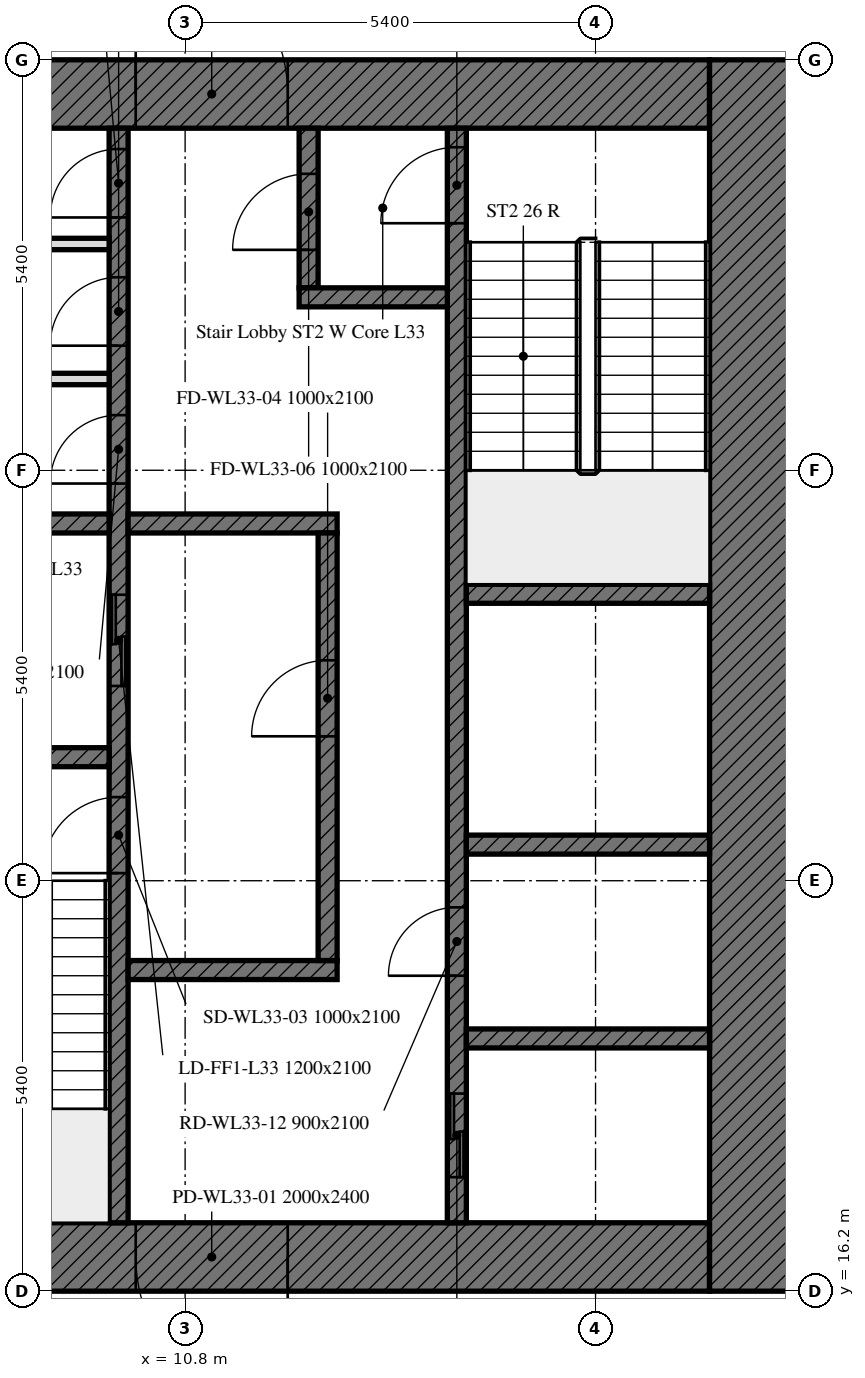
"""IFC4 building model, lengths in metres.
Left out: names, types, materials, properties, quantities, classifications, styles, units other than length and angle.
Written with IfcOpenShell. Run it as: python <this file> out.ifc"""

import sys

from ifc_helpers import new_model, si_unit, direction, frame, frame_2d, origin, place, context, subcontext, project, spatial, rectangle, extrude, element, fill, save


model = new_model("IFC4")
c1 = context("Model", 3, precision=1e-05, world=origin(), true_north=direction((0.0, 1.0)))
c2 = subcontext(c1, "Body", "Model", "MODEL_VIEW")
j1 = project(units=[si_unit("LENGTHUNIT", "METRE"), si_unit("PLANEANGLEUNIT", "RADIAN")], contexts=[c1])
p1 = place(None, origin())
s1 = spatial("IfcSite", under=j1, at=p1, CompositionType="ELEMENT")
p2 = place(p1, origin())
s2 = spatial("IfcBuilding", under=s1, at=p2, CompositionType="ELEMENT")
p3 = place(p2, frame((0.0, 0.0, 143.2)))
s3 = spatial("IfcBuildingStorey", under=s2, at=p3, CompositionType="ELEMENT", Elevation=143.2)
p4 = place(p3, frame((17.7, 16.65, 0.0), z_axis=(0.0, 0.0, 1.0), x_axis=(-1.0, 0.0, 0.0)))
e1 = element("IfcWall", 1, at=p4, inside=s3, PredefinedType="SOLIDWALL", context=c2, shape_type="SweptSolid", body=[
    extrude(rectangle(XDim=11.1, YDim=0.9, at=frame_2d((5.55, 0.0))), origin(), (0.0, 0.0, 1.0), 4.5),
])
p5 = place(p4, frame((5.55, 0.0, 0.0)))
e2 = element("IfcOpeningElement", 2, at=p5, cuts=e1, PredefinedType="OPENING", context=c2, shape_type="SweptSolid", body=[
    extrude(rectangle(XDim=2.0, YDim=2.4, at=frame_2d((1.0, 1.2))), frame((0.0, 0.45, 0.0), z_axis=(0.0, -1.0, 0.0), x_axis=(1.0, 0.0, 0.0)), (0.0, 0.0, 1.0), 0.9),
])
p6 = place(p3, frame((6.6, 31.95, 0.0), z_axis=(0.0, 0.0, 1.0), x_axis=(1.0, 0.0, 0.0)))
e3 = element("IfcWall", 3, at=p6, inside=s3, PredefinedType="SOLIDWALL", context=c2, shape_type="SweptSolid", body=[
    extrude(rectangle(XDim=11.1, YDim=0.9, at=frame_2d((5.55, 0.0))), origin(), (0.0, 0.0, 1.0), 4.5),
])
p7 = place(p6, frame((3.55, 0.0, 0.0)))
e4 = element("IfcOpeningElement", 4, at=p7, cuts=e3, PredefinedType="OPENING", context=c2, shape_type="SweptSolid", body=[
    extrude(rectangle(XDim=2.0, YDim=2.4, at=frame_2d((1.0, 1.2))), frame((0.0, 0.45, 0.0), z_axis=(0.0, -1.0, 0.0), x_axis=(1.0, 0.0, 0.0)), (0.0, 0.0, 1.0), 0.9),
])
p8 = place(p3, frame((18.3, 32.4, 0.0), z_axis=(0.0, 0.0, 1.0), x_axis=(0.0, -1.0, 0.0)))
e5 = element("IfcWall", 5, at=p8, inside=s3, PredefinedType="SOLIDWALL", context=c2, shape_type="SweptSolid", body=[
    extrude(rectangle(XDim=16.2, YDim=1.2, at=frame_2d((8.1, 0.0))), origin(), (0.0, 0.0, 1.0), 4.5),
])
p9 = place(p3, frame((9.925, 17.1, 0.0), z_axis=(0.0, 0.0, 1.0), x_axis=(0.0, 1.0, 0.0)))
e6 = element("IfcWall", 6, at=p9, inside=s3, PredefinedType="SOLIDWALL", context=c2, shape_type="SweptSolid", body=[
    extrude(rectangle(XDim=14.4, YDim=0.25, at=frame_2d((7.2, 0.0))), origin(), (0.0, 0.0, 1.0), 4.5),
])
p10 = place(p9, frame((4.6, 0.0, 0.0)))
e7 = element("IfcOpeningElement", 7, at=p10, cuts=e6, PredefinedType="OPENING", context=c2, shape_type="SweptSolid", body=[
    extrude(rectangle(XDim=1.0, YDim=2.1, at=frame_2d((0.5, 1.05))), frame((0.0, 0.125, 0.0), z_axis=(0.0, -1.0, 0.0), x_axis=(1.0, 0.0, 0.0)), (0.0, 0.0, 1.0), 0.25),
])
p11 = place(p9, frame((7.062, 0.0, 0.0)))
e8 = element("IfcOpeningElement", 8, at=p11, cuts=e6, PredefinedType="OPENING", context=c2, shape_type="SweptSolid", body=[
    extrude(rectangle(XDim=1.2, YDim=2.1, at=frame_2d((0.6, 1.05))), frame((0.0, 0.125, 0.0), z_axis=(0.0, -1.0, 0.0), x_axis=(1.0, 0.0, 0.0)), (0.0, 0.0, 1.0), 0.25),
])
p12 = place(p9, frame((9.726, 0.0, 0.0)))
e9 = element("IfcOpeningElement", 9, at=p12, cuts=e6, PredefinedType="OPENING", context=c2, shape_type="SweptSolid", body=[
    extrude(rectangle(XDim=0.9, YDim=2.1, at=frame_2d((0.45, 1.05))), frame((0.0, 0.125, 0.0), z_axis=(0.0, -1.0, 0.0), x_axis=(1.0, 0.0, 0.0)), (0.0, 0.0, 1.0), 0.25),
])
p13 = place(p9, frame((11.539, 0.0, 0.0)))
e10 = element("IfcOpeningElement", 10, at=p13, cuts=e6, PredefinedType="OPENING", context=c2, shape_type="SweptSolid", body=[
    extrude(rectangle(XDim=0.9, YDim=2.1, at=frame_2d((0.45, 1.05))), frame((0.0, 0.125, 0.0), z_axis=(0.0, -1.0, 0.0), x_axis=(1.0, 0.0, 0.0)), (0.0, 0.0, 1.0), 0.25),
])
p14 = place(p9, frame((13.226, 0.0, 0.0)))
e11 = element("IfcOpeningElement", 11, at=p14, cuts=e6, PredefinedType="OPENING", context=c2, shape_type="SweptSolid", body=[
    extrude(rectangle(XDim=0.9, YDim=2.1, at=frame_2d((0.45, 1.05))), frame((0.0, 0.125, 0.0), z_axis=(0.0, -1.0, 0.0), x_axis=(1.0, 0.0, 0.0)), (0.0, 0.0, 1.0), 0.25),
])
p15 = place(p3, frame((14.375, 17.1, 0.0), z_axis=(0.0, 0.0, 1.0), x_axis=(0.0, 1.0, 0.0)))
e12 = element("IfcWall", 12, at=p15, inside=s3, PredefinedType="SOLIDWALL", context=c2, shape_type="SweptSolid", body=[
    extrude(rectangle(XDim=14.4, YDim=0.25, at=frame_2d((7.2, 0.0))), origin(), (0.0, 0.0, 1.0), 4.5),
])
p16 = place(p15, frame((13.15, 0.0, 0.0)))
e13 = element("IfcOpeningElement", 13, at=p16, cuts=e12, PredefinedType="OPENING", context=c2, shape_type="SweptSolid", body=[
    extrude(rectangle(XDim=1.0, YDim=2.1, at=frame_2d((0.5, 1.05))), frame((0.0, 0.125, 0.0), z_axis=(0.0, -1.0, 0.0), x_axis=(1.0, 0.0, 0.0)), (0.0, 0.0, 1.0), 0.25),
])
p17 = place(p15, frame((0.6, 0.0, 0.0)))
e14 = element("IfcOpeningElement", 14, at=p17, cuts=e12, PredefinedType="OPENING", context=c2, shape_type="SweptSolid", body=[
    extrude(rectangle(XDim=1.1, YDim=2.1, at=frame_2d((0.55, 1.05))), frame((0.0, 0.125, 0.0), z_axis=(0.0, -1.0, 0.0), x_axis=(1.0, 0.0, 0.0)), (0.0, 0.0, 1.0), 0.25),
])
p18 = place(p15, frame((3.25, 0.0, 0.0)))
e15 = element("IfcOpeningElement", 15, at=p18, cuts=e12, PredefinedType="OPENING", context=c2, shape_type="SweptSolid", body=[
    extrude(rectangle(XDim=0.9, YDim=2.1, at=frame_2d((0.45, 1.05))), frame((0.0, 0.125, 0.0), z_axis=(0.0, -1.0, 0.0), x_axis=(1.0, 0.0, 0.0)), (0.0, 0.0, 1.0), 0.25),
])
for number, where, z_axis, x_axis in (
    (16, (6.6, 23.225, 0.0), (0.0, 0.0, 1.0), (1.0, 0.0, 0.0)),
    (17, (14.5, 25.375, 0.0), (0.0, 0.0, 1.0), (1.0, 0.0, 0.0)),
    (18, (14.5, 22.075, 0.0), (0.0, 0.0, 1.0), (1.0, 0.0, 0.0)),
    (19, (6.6, 26.3, 0.0), (0.0, 0.0, 1.0), (1.0, 0.0, 0.0)),
):
    element("IfcWall", number, at=place(p3, frame(where, z_axis=z_axis, x_axis=x_axis)), inside=s3, PredefinedType="SOLIDWALL", context=c2, shape_type="SweptSolid", body=[
        extrude(rectangle(XDim=3.2, YDim=0.25, at=frame_2d((1.6, 0.0))), origin(), (0.0, 0.0, 1.0), 4.5),
    ])
for number, where, z_axis, x_axis in (
    (20, (10.05, 26.3, 0.0), (0.0, 0.0, 1.0), (1.0, 0.0, 0.0)),
    (21, (10.05, 20.425, 0.0), (0.0, 0.0, 1.0), (1.0, 0.0, 0.0)),
):
    element("IfcWall", number, at=place(p3, frame(where, z_axis=z_axis, x_axis=x_axis)), inside=s3, PredefinedType="SOLIDWALL", context=c2, shape_type="SweptSolid", body=[
        extrude(rectangle(XDim=2.75, YDim=0.25, at=frame_2d((1.375, 0.0))), origin(), (0.0, 0.0, 1.0), 4.5),
    ])
p19 = place(p3, frame((12.425, 29.4, 0.0), z_axis=(0.0, 0.0, 1.0), x_axis=(0.0, 1.0, 0.0)))
e22 = element("IfcWall", 22, at=p19, inside=s3, PredefinedType="SOLIDWALL", context=c2, shape_type="SweptSolid", body=[
    extrude(rectangle(XDim=2.1, YDim=0.25, at=frame_2d((1.05, 0.0))), origin(), (0.0, 0.0, 1.0), 4.5),
])
p20 = place(p19, frame((0.5, 0.0, 0.0)))
e23 = element("IfcOpeningElement", 23, at=p20, cuts=e22, PredefinedType="OPENING", context=c2, shape_type="SweptSolid", body=[
    extrude(rectangle(XDim=1.0, YDim=2.1, at=frame_2d((0.5, 1.05))), frame((0.0, 0.125, 0.0), z_axis=(0.0, -1.0, 0.0), x_axis=(1.0, 0.0, 0.0)), (0.0, 0.0, 1.0), 0.25),
])
p21 = place(p3, frame((12.3, 29.275, 0.0), z_axis=(0.0, 0.0, 1.0), x_axis=(1.0, 0.0, 0.0)))
e24 = element("IfcWall", 24, at=p21, inside=s3, PredefinedType="SOLIDWALL", context=c2, shape_type="SweptSolid", body=[
    extrude(rectangle(XDim=1.95, YDim=0.25, at=frame_2d((0.975, 0.0))), origin(), (0.0, 0.0, 1.0), 4.5),
])
p22 = place(p3, frame((12.675, 20.55, 0.0), z_axis=(0.0, 0.0, 1.0), x_axis=(0.0, 1.0, 0.0)))
e25 = element("IfcWall", 25, at=p22, inside=s3, PredefinedType="SOLIDWALL", context=c2, shape_type="SweptSolid", body=[
    extrude(rectangle(XDim=5.625, YDim=0.25, at=frame_2d((2.812, 0.0))), origin(), (0.0, 0.0, 1.0), 4.5),
])
p23 = place(p22, frame((2.95, 0.0, 0.0)))
e26 = element("IfcOpeningElement", 26, at=p23, cuts=e25, PredefinedType="OPENING", context=c2, shape_type="SweptSolid", body=[
    extrude(rectangle(XDim=1.0, YDim=2.1, at=frame_2d((0.5, 1.05))), frame((0.0, 0.125, 0.0), z_axis=(0.0, -1.0, 0.0), x_axis=(1.0, 0.0, 0.0)), (0.0, 0.0, 1.0), 0.25),
])
p24 = place(p3, frame((14.5, 19.525, 0.0), z_axis=(0.0, 0.0, 1.0), x_axis=(1.0, 0.0, 0.0)))
e27 = element("IfcWall", 27, at=p24, inside=s3, PredefinedType="SOLIDWALL", context=c2, shape_type="SweptSolid", body=[
    extrude(rectangle(XDim=3.2, YDim=0.25, at=frame_2d((1.6, 0.0))), origin(), (0.0, 0.0, 1.0), 4.5),
])
for number, where, z_axis, x_axis in (
    (28, (6.6, 28.201, 0.0), (0.0, 0.0, 1.0), (1.0, 0.0, 0.0)),
    (29, (6.6, 29.977, 0.0), (0.0, 0.0, 1.0), (1.0, 0.0, 0.0)),
):
    element("IfcWall", number, at=place(p3, frame(where, z_axis=z_axis, x_axis=x_axis)), inside=s3, PredefinedType="PARTITIONING", context=c2, shape_type="SweptSolid", body=[
        extrude(rectangle(XDim=3.2, YDim=0.15, at=frame_2d((1.6, 0.0))), origin(), (0.0, 0.0, 1.0), 4.5),
    ])
p25 = place(p5, origin())
e30 = element("IfcDoor", 30, at=p25, inside=s3, OperationType="DOUBLE_DOOR_SINGLE_SWING", PredefinedType="DOOR", context=c2, shape_type="SweptSolid", body=[
    extrude(rectangle(XDim=2.0, YDim=2.4, at=frame_2d((1.0, 1.2))), frame((0.0, 0.025, 0.0), z_axis=(0.0, -1.0, 0.0), x_axis=(1.0, 0.0, 0.0)), (0.0, 0.0, 1.0), 0.05),
])
fill(e2, e30)
p26 = place(p7, origin())
e31 = element("IfcDoor", 31, at=p26, inside=s3, OperationType="DOUBLE_DOOR_SINGLE_SWING", PredefinedType="DOOR", context=c2, shape_type="SweptSolid", body=[
    extrude(rectangle(XDim=2.0, YDim=2.4, at=frame_2d((1.0, 1.2))), frame((0.0, 0.025, 0.0), z_axis=(0.0, -1.0, 0.0), x_axis=(1.0, 0.0, 0.0)), (0.0, 0.0, 1.0), 0.05),
])
fill(e4, e31)
p27 = place(p10, origin())
e32 = element("IfcDoor", 32, at=p27, inside=s3, OperationType="SINGLE_SWING_LEFT", PredefinedType="DOOR", context=c2, shape_type="SweptSolid", body=[
    extrude(rectangle(XDim=1.0, YDim=2.1, at=frame_2d((0.5, 1.05))), frame((0.0, 0.025, 0.0), z_axis=(0.0, -1.0, 0.0), x_axis=(1.0, 0.0, 0.0)), (0.0, 0.0, 1.0), 0.05),
])
fill(e7, e32)
p28 = place(p23, origin())
e33 = element("IfcDoor", 33, at=p28, inside=s3, OperationType="SINGLE_SWING_LEFT", PredefinedType="DOOR", context=c2, shape_type="SweptSolid", body=[
    extrude(rectangle(XDim=1.0, YDim=2.1, at=frame_2d((0.5, 1.05))), frame((0.0, 0.025, 0.0), z_axis=(0.0, -1.0, 0.0), x_axis=(1.0, 0.0, 0.0)), (0.0, 0.0, 1.0), 0.05),
])
fill(e26, e33)
p29 = place(p16, origin())
e34 = element("IfcDoor", 34, at=p29, inside=s3, OperationType="SINGLE_SWING_LEFT", PredefinedType="DOOR", context=c2, shape_type="SweptSolid", body=[
    extrude(rectangle(XDim=1.0, YDim=2.1, at=frame_2d((0.5, 1.05))), frame((0.0, 0.025, 0.0), z_axis=(0.0, -1.0, 0.0), x_axis=(1.0, 0.0, 0.0)), (0.0, 0.0, 1.0), 0.05),
])
fill(e13, e34)
p30 = place(p20, origin())
e35 = element("IfcDoor", 35, at=p30, inside=s3, OperationType="SINGLE_SWING_LEFT", PredefinedType="DOOR", context=c2, shape_type="SweptSolid", body=[
    extrude(rectangle(XDim=1.0, YDim=2.1, at=frame_2d((0.5, 1.05))), frame((0.0, 0.025, 0.0), z_axis=(0.0, -1.0, 0.0), x_axis=(1.0, 0.0, 0.0)), (0.0, 0.0, 1.0), 0.05),
])
fill(e23, e35)
p31 = place(p11, origin())
e36 = element("IfcDoor", 36, at=p31, inside=s3, OperationType="DOUBLE_DOOR_SLIDING", PredefinedType="DOOR", context=c2, shape_type="SweptSolid", body=[
    extrude(rectangle(XDim=1.2, YDim=2.1, at=frame_2d((0.6, 1.05))), frame((0.0, 0.025, 0.0), z_axis=(0.0, -1.0, 0.0), x_axis=(1.0, 0.0, 0.0)), (0.0, 0.0, 1.0), 0.05),
])
fill(e8, e36)
p32 = place(p17, origin())
e37 = element("IfcDoor", 37, at=p32, inside=s3, OperationType="DOUBLE_DOOR_SLIDING", PredefinedType="DOOR", context=c2, shape_type="SweptSolid", body=[
    extrude(rectangle(XDim=1.1, YDim=2.1, at=frame_2d((0.55, 1.05))), frame((0.0, 0.025, 0.0), z_axis=(0.0, -1.0, 0.0), x_axis=(1.0, 0.0, 0.0)), (0.0, 0.0, 1.0), 0.05),
])
fill(e14, e37)
p33 = place(p12, origin())
e38 = element("IfcDoor", 38, at=p33, inside=s3, OperationType="SINGLE_SWING_LEFT", PredefinedType="DOOR", context=c2, shape_type="SweptSolid", body=[
    extrude(rectangle(XDim=0.9, YDim=2.1, at=frame_2d((0.45, 1.05))), frame((0.0, 0.025, 0.0), z_axis=(0.0, -1.0, 0.0), x_axis=(1.0, 0.0, 0.0)), (0.0, 0.0, 1.0), 0.05),
])
fill(e9, e38)
p34 = place(p13, origin())
e39 = element("IfcDoor", 39, at=p34, inside=s3, OperationType="SINGLE_SWING_LEFT", PredefinedType="DOOR", context=c2, shape_type="SweptSolid", body=[
    extrude(rectangle(XDim=0.9, YDim=2.1, at=frame_2d((0.45, 1.05))), frame((0.0, 0.025, 0.0), z_axis=(0.0, -1.0, 0.0), x_axis=(1.0, 0.0, 0.0)), (0.0, 0.0, 1.0), 0.05),
])
fill(e10, e39)
p35 = place(p14, origin())
e40 = element("IfcDoor", 40, at=p35, inside=s3, OperationType="SINGLE_SWING_LEFT", PredefinedType="DOOR", context=c2, shape_type="SweptSolid", body=[
    extrude(rectangle(XDim=0.9, YDim=2.1, at=frame_2d((0.45, 1.05))), frame((0.0, 0.025, 0.0), z_axis=(0.0, -1.0, 0.0), x_axis=(1.0, 0.0, 0.0)), (0.0, 0.0, 1.0), 0.05),
])
fill(e11, e40)
p36 = place(p18, origin())
e41 = element("IfcDoor", 41, at=p36, inside=s3, OperationType="SINGLE_SWING_LEFT", PredefinedType="DOOR", context=c2, shape_type="SweptSolid", body=[
    extrude(rectangle(XDim=0.9, YDim=2.1, at=frame_2d((0.45, 1.05))), frame((0.0, 0.025, 0.0), z_axis=(0.0, -1.0, 0.0), x_axis=(1.0, 0.0, 0.0)), (0.0, 0.0, 1.0), 0.05),
])
fill(e15, e41)
save(model, sys.argv[1])
